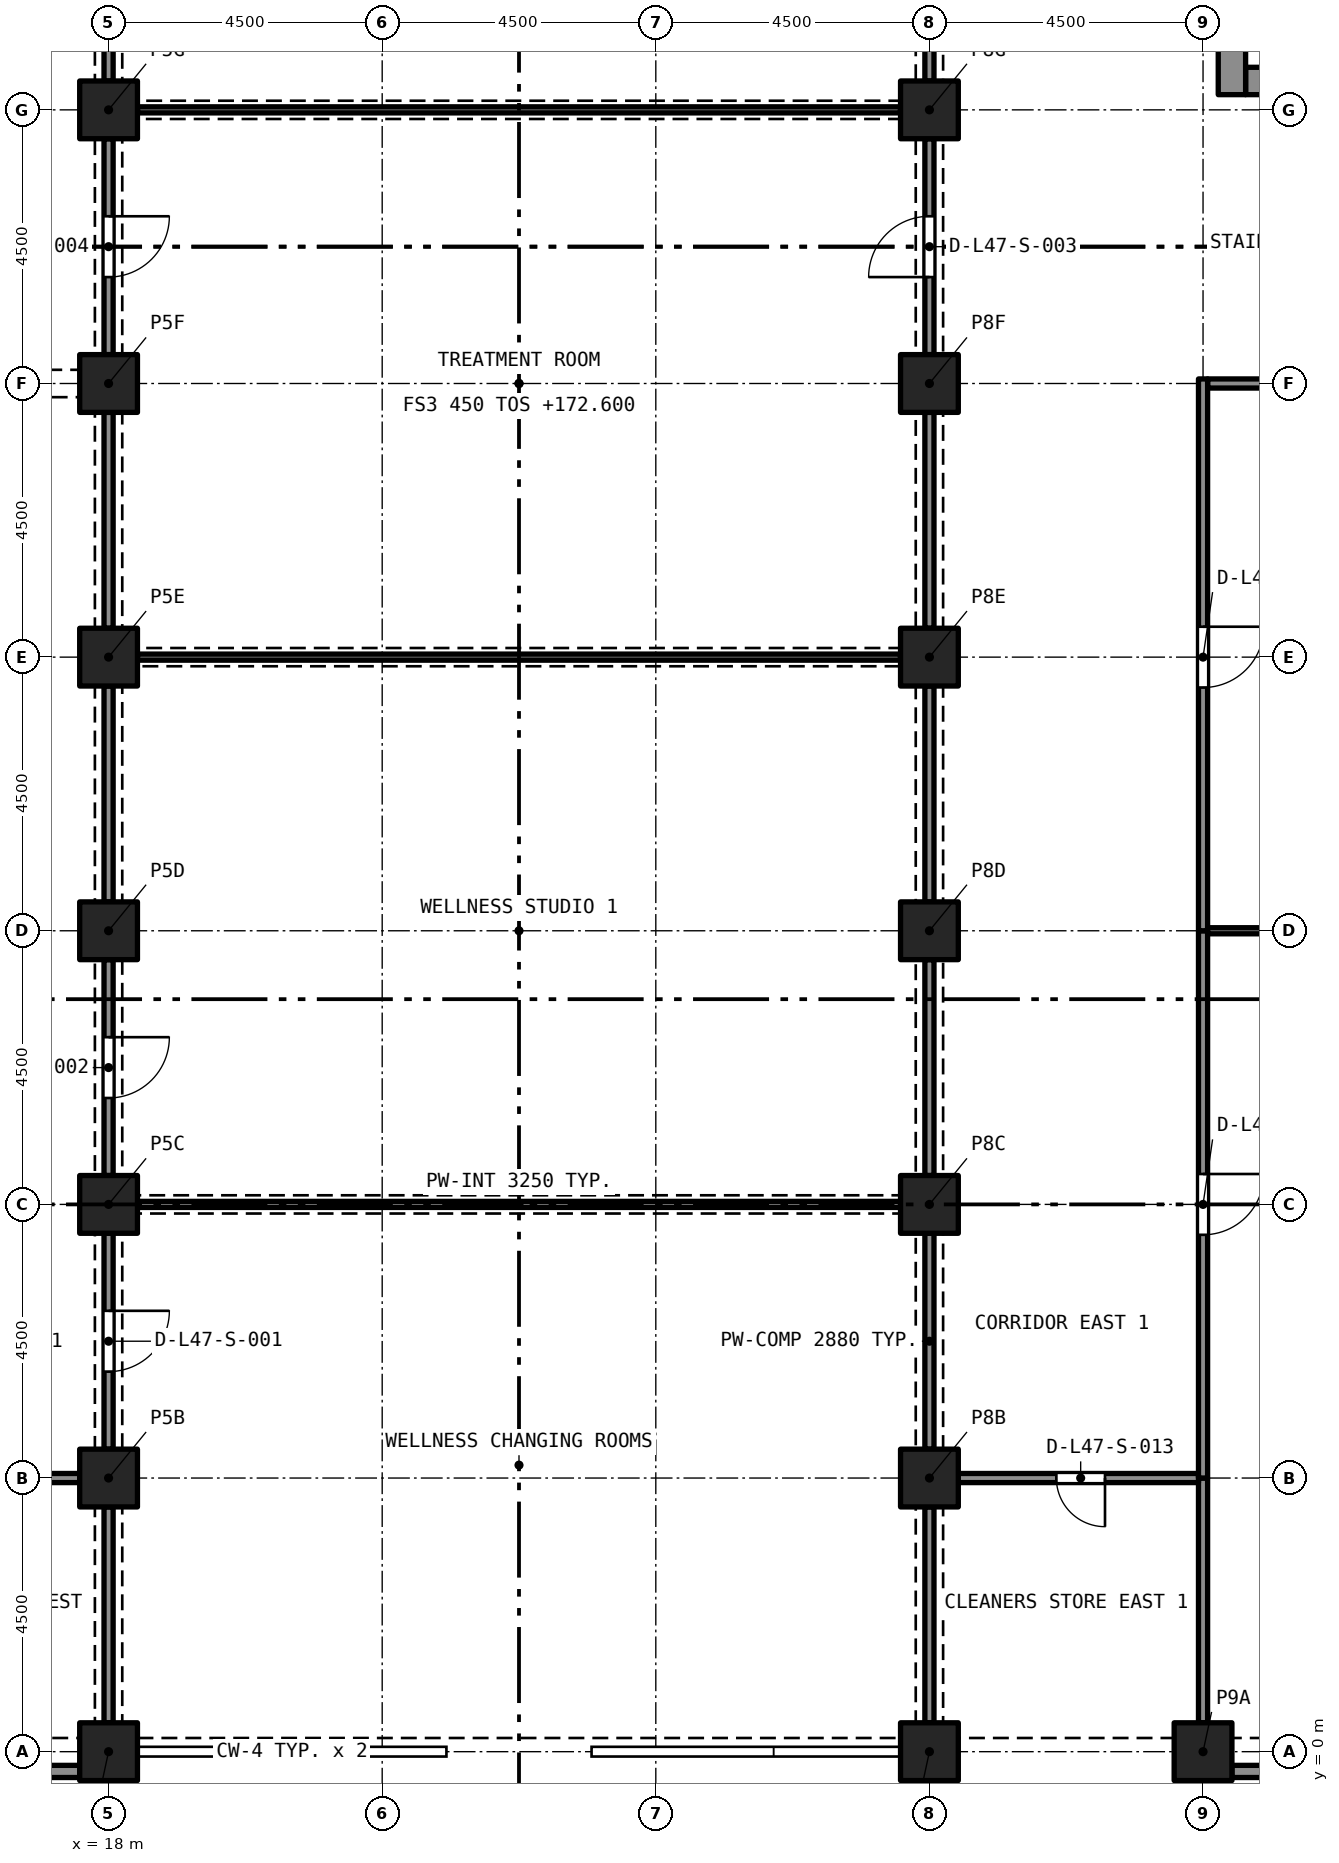
"""IFC4 building model, lengths in metres.
Left out: names, types, materials, properties, quantities, classifications, styles, units other than length and angle.
Written with IfcOpenShell. Run it as: python <this file> out.ifc"""

import sys

from ifc_helpers import new_model, si_unit, direction, frame, frame_2d, origin, origin_2d, place, context, subcontext, project, spatial, rectangle, extrude, element, fill, save


model = new_model("IFC4")
c1 = context("Model", 3, precision=1e-05, world=origin(), true_north=direction((0.0, 1.0)))
c2 = subcontext(c1, "Body", "Model", "MODEL_VIEW")
j1 = project(units=[si_unit("LENGTHUNIT", "METRE"), si_unit("PLANEANGLEUNIT", "RADIAN")], contexts=[c1])
p1 = place(None, origin())
s1 = spatial("IfcSite", under=j1, at=p1, CompositionType="ELEMENT")
p2 = place(p1, origin())
s2 = spatial("IfcBuilding", under=s1, at=p2, CompositionType="ELEMENT")
p3 = place(p2, frame((0.0, 0.0, 172.6)))
s3 = spatial("IfcBuildingStorey", under=s2, at=p3, CompositionType="ELEMENT", Elevation=172.6)
for number, where, z_axis, x_axis in (
    (1, (18.0, 0.0, 0.0), (0.0, 0.0, 1.0), (1.0, 0.0, 0.0)),
    (2, (31.5, 0.0, 0.0), (0.0, 0.0, 1.0), (1.0, 0.0, 0.0)),
    (3, (36.0, 0.0, 0.0), (0.0, 0.0, 1.0), (1.0, 0.0, 0.0)),
    (4, (18.0, 4.5, 0.0), (0.0, 0.0, 1.0), (1.0, 0.0, 0.0)),
    (5, (31.5, 4.5, 0.0), (0.0, 0.0, 1.0), (1.0, 0.0, 0.0)),
    (6, (18.0, 9.0, 0.0), (0.0, 0.0, 1.0), (1.0, 0.0, 0.0)),
    (7, (31.5, 9.0, 0.0), (0.0, 0.0, 1.0), (1.0, 0.0, 0.0)),
    (8, (18.0, 13.5, 0.0), (0.0, 0.0, 1.0), (1.0, 0.0, 0.0)),
    (9, (31.5, 13.5, 0.0), (0.0, 0.0, 1.0), (1.0, 0.0, 0.0)),
    (10, (18.0, 18.0, 0.0), (0.0, 0.0, 1.0), (1.0, 0.0, 0.0)),
    (11, (31.5, 18.0, 0.0), (0.0, 0.0, 1.0), (1.0, 0.0, 0.0)),
    (12, (18.0, 22.5, 0.0), (0.0, 0.0, 1.0), (1.0, 0.0, 0.0)),
    (13, (31.5, 22.5, 0.0), (0.0, 0.0, 1.0), (1.0, 0.0, 0.0)),
    (14, (18.0, 27.0, 0.0), (0.0, 0.0, 1.0), (1.0, 0.0, 0.0)),
    (15, (31.5, 27.0, 0.0), (0.0, 0.0, 1.0), (1.0, 0.0, 0.0)),
):
    element("IfcColumn", number, at=place(p3, frame(where, z_axis=z_axis, x_axis=x_axis)), inside=s3, PredefinedType="COLUMN", context=c2, shape_type="SweptSolid", body=[
        extrude(rectangle(XDim=0.95, YDim=0.95, at=origin_2d()), origin(), (0.0, 0.0, 1.0), 3.7),
    ])
p4 = place(p3, frame((36.7, 27.475, 0.0), z_axis=(0.0, 0.0, 1.0), x_axis=(1.0, 0.0, 0.0)))
e16 = element("IfcWall", 16, at=p4, inside=s3, PredefinedType="SOLIDWALL", context=c2, shape_type="SweptSolid", body=[
    extrude(rectangle(XDim=7.6, YDim=0.45, at=frame_2d((3.8, 0.0))), origin(), (0.0, 0.0, 1.0), 3.7),
])
p5 = place(p4, frame((5.775, 0.0, 0.0)))
e17 = element("IfcOpeningElement", 17, at=p5, cuts=e16, PredefinedType="OPENING", context=c2, shape_type="SweptSolid", body=[
    extrude(rectangle(XDim=1.1, YDim=2.1, at=frame_2d((0.55, 1.05))), frame((0.0, 0.235, 0.0), z_axis=(0.0, -1.0, 0.0), x_axis=(1.0, 0.0, 0.0)), (0.0, 0.0, 1.0), 0.47),
])
p6 = place(p4, frame((3.25, 0.0, 0.0)))
e18 = element("IfcOpeningElement", 18, at=p6, cuts=e16, PredefinedType="OPENING", context=c2, shape_type="SweptSolid", body=[
    extrude(rectangle(XDim=1.1, YDim=2.1, at=frame_2d((0.55, 1.05))), frame((0.0, 0.235, 0.0), z_axis=(0.0, -1.0, 0.0), x_axis=(1.0, 0.0, 0.0)), (0.0, 0.0, 1.0), 0.47),
])
p7 = place(p4, frame((0.725, 0.0, 0.0)))
e19 = element("IfcOpeningElement", 19, at=p7, cuts=e16, PredefinedType="OPENING", context=c2, shape_type="SweptSolid", body=[
    extrude(rectangle(XDim=1.1, YDim=2.1, at=frame_2d((0.55, 1.05))), frame((0.0, 0.235, 0.0), z_axis=(0.0, -1.0, 0.0), x_axis=(1.0, 0.0, 0.0)), (0.0, 0.0, 1.0), 0.47),
])
p8 = place(p3, frame((36.475, 27.25, 0.0), z_axis=(0.0, 0.0, 1.0), x_axis=(0.0, 1.0, 0.0)))
e20 = element("IfcWall", 20, at=p8, inside=s3, PredefinedType="SOLIDWALL", context=c2, shape_type="SweptSolid", body=[
    extrude(rectangle(XDim=13.0, YDim=0.45, at=frame_2d((6.5, 0.0))), origin(), (0.0, 0.0, 1.0), 3.7),
])
p9 = place(p8, frame((8.7, 0.0, 0.0)))
e21 = element("IfcOpeningElement", 21, at=p9, cuts=e20, PredefinedType="OPENING", context=c2, shape_type="SweptSolid", body=[
    extrude(rectangle(XDim=1.2, YDim=2.1, at=frame_2d((0.6, 1.05))), frame((0.0, 0.235, 0.0), z_axis=(0.0, -1.0, 0.0), x_axis=(1.0, 0.0, 0.0)), (0.0, 0.0, 1.0), 0.47),
])
p10 = place(p3, frame((17.525, -0.325, 0.0), z_axis=(0.0, 0.0, 1.0), x_axis=(-1.0, 0.0, 0.0)))
e22 = element("IfcWall", 22, at=p10, inside=s3, PredefinedType="SOLIDWALL", context=c2, shape_type="SweptSolid", body=[
    extrude(rectangle(XDim=3.55, YDim=0.2, at=frame_2d((1.775, 0.0))), origin(), (0.0, 0.0, 1.0), 3.7),
])
p11 = place(p10, frame((0.575, 0.0, 0.45)))
e23 = element("IfcOpeningElement", 23, at=p11, cuts=e22, PredefinedType="OPENING", context=c2, shape_type="SweptSolid", body=[
    extrude(rectangle(XDim=2.4, YDim=1.95, at=frame_2d((1.2, 0.975))), frame((0.0, 0.11, 0.0), z_axis=(0.0, -1.0, 0.0), x_axis=(1.0, 0.0, 0.0)), (0.0, 0.0, 1.0), 0.22),
])
p12 = place(p3, frame((40.025, -0.325, 0.0), z_axis=(0.0, 0.0, 1.0), x_axis=(-1.0, 0.0, 0.0)))
e24 = element("IfcWall", 24, at=p12, inside=s3, PredefinedType="SOLIDWALL", context=c2, shape_type="SweptSolid", body=[
    extrude(rectangle(XDim=3.55, YDim=0.2, at=frame_2d((1.775, 0.0))), origin(), (0.0, 0.0, 1.0), 3.7),
])
p13 = place(p12, frame((0.575, 0.0, 0.45)))
e25 = element("IfcOpeningElement", 25, at=p13, cuts=e24, PredefinedType="OPENING", context=c2, shape_type="SweptSolid", body=[
    extrude(rectangle(XDim=2.4, YDim=1.95, at=frame_2d((1.2, 0.975))), frame((0.0, 0.11, 0.0), z_axis=(0.0, -1.0, 0.0), x_axis=(1.0, 0.0, 0.0)), (0.0, 0.0, 1.0), 0.22),
])
p14 = place(p3, frame((18.475, 9.0, 0.0), z_axis=(0.0, 0.0, 1.0), x_axis=(1.0, 0.0, 0.0)))
e26 = element("IfcWall", 26, at=p14, inside=s3, PredefinedType="PARTITIONING", context=c2, shape_type="SweptSolid", body=[
    extrude(rectangle(XDim=12.55, YDim=0.1, at=frame_2d((6.275, 0.0))), origin(), (0.0, 0.0, 1.0), 3.25),
])
for number, where, z_axis, x_axis in (
    (27, (31.5, 0.475, 0.0), (0.0, 0.0, 1.0), (0.0, 1.0, 0.0)),
    (28, (31.5, 4.975, 0.0), (0.0, 0.0, 1.0), (0.0, 1.0, 0.0)),
    (29, (18.0, 0.475, 0.0), (0.0, 0.0, 1.0), (0.0, 1.0, 0.0)),
):
    element("IfcWall", number, at=place(p3, frame(where, z_axis=z_axis, x_axis=x_axis)), inside=s3, PredefinedType="PARTITIONING", context=c2, shape_type="SweptSolid", body=[
        extrude(rectangle(XDim=3.55, YDim=0.15, at=frame_2d((1.775, 0.0))), origin(), (0.0, 0.0, 1.0), 2.88),
    ])
p15 = place(p3, frame((18.0, 8.525, 0.0), z_axis=(0.0, 0.0, 1.0), x_axis=(0.0, -1.0, 0.0)))
e30 = element("IfcWall", 30, at=p15, inside=s3, PredefinedType="PARTITIONING", context=c2, shape_type="SweptSolid", body=[
    extrude(rectangle(XDim=3.55, YDim=0.15, at=frame_2d((1.775, 0.0))), origin(), (0.0, 0.0, 1.0), 2.88),
])
p16 = place(p15, frame((1.275, 0.0, 0.0)))
e31 = element("IfcOpeningElement", 31, at=p16, cuts=e30, PredefinedType="OPENING", context=c2, shape_type="SweptSolid", body=[
    extrude(rectangle(XDim=1.0, YDim=2.1, at=frame_2d((0.5, 1.05))), frame((0.0, 0.085, 0.0), z_axis=(0.0, -1.0, 0.0), x_axis=(1.0, 0.0, 0.0)), (0.0, 0.0, 1.0), 0.17),
])
p17 = place(p3, frame((18.475, 18.0, 0.0), z_axis=(0.0, 0.0, 1.0), x_axis=(1.0, 0.0, 0.0)))
e32 = element("IfcWall", 32, at=p17, inside=s3, PredefinedType="PARTITIONING", context=c2, shape_type="SweptSolid", body=[
    extrude(rectangle(XDim=12.55, YDim=0.1, at=frame_2d((6.275, 0.0))), origin(), (0.0, 0.0, 1.0), 3.25),
])
for number, where, z_axis, x_axis in (
    (33, (31.5, 13.975, 0.0), (0.0, 0.0, 1.0), (0.0, 1.0, 0.0)),
    (34, (31.5, 9.475, 0.0), (0.0, 0.0, 1.0), (0.0, 1.0, 0.0)),
):
    element("IfcWall", number, at=place(p3, frame(where, z_axis=z_axis, x_axis=x_axis)), inside=s3, PredefinedType="PARTITIONING", context=c2, shape_type="SweptSolid", body=[
        extrude(rectangle(XDim=3.55, YDim=0.15, at=frame_2d((1.775, 0.0))), origin(), (0.0, 0.0, 1.0), 2.88),
    ])
p18 = place(p3, frame((18.0, 13.025, 0.0), z_axis=(0.0, 0.0, 1.0), x_axis=(0.0, -1.0, 0.0)))
e35 = element("IfcWall", 35, at=p18, inside=s3, PredefinedType="PARTITIONING", context=c2, shape_type="SweptSolid", body=[
    extrude(rectangle(XDim=3.55, YDim=0.15, at=frame_2d((1.775, 0.0))), origin(), (0.0, 0.0, 1.0), 2.88),
])
p19 = place(p18, frame((1.275, 0.0, 0.0)))
e36 = element("IfcOpeningElement", 36, at=p19, cuts=e35, PredefinedType="OPENING", context=c2, shape_type="SweptSolid", body=[
    extrude(rectangle(XDim=1.0, YDim=2.1, at=frame_2d((0.5, 1.05))), frame((0.0, 0.085, 0.0), z_axis=(0.0, -1.0, 0.0), x_axis=(1.0, 0.0, 0.0)), (0.0, 0.0, 1.0), 0.17),
])
p20 = place(p3, frame((18.0, 13.975, 0.0), z_axis=(0.0, 0.0, 1.0), x_axis=(0.0, 1.0, 0.0)))
e37 = element("IfcWall", 37, at=p20, inside=s3, PredefinedType="PARTITIONING", context=c2, shape_type="SweptSolid", body=[
    extrude(rectangle(XDim=3.55, YDim=0.15, at=frame_2d((1.775, 0.0))), origin(), (0.0, 0.0, 1.0), 2.88),
])
p21 = place(p3, frame((18.475, 27.0, 0.0), z_axis=(0.0, 0.0, 1.0), x_axis=(1.0, 0.0, 0.0)))
e38 = element("IfcWall", 38, at=p21, inside=s3, PredefinedType="PARTITIONING", context=c2, shape_type="SweptSolid", body=[
    extrude(rectangle(XDim=12.55, YDim=0.1, at=frame_2d((6.275, 0.0))), origin(), (0.0, 0.0, 1.0), 3.25),
])
p22 = place(p3, frame((31.5, 22.975, 0.0), z_axis=(0.0, 0.0, 1.0), x_axis=(0.0, 1.0, 0.0)))
e39 = element("IfcWall", 39, at=p22, inside=s3, PredefinedType="PARTITIONING", context=c2, shape_type="SweptSolid", body=[
    extrude(rectangle(XDim=3.55, YDim=0.15, at=frame_2d((1.775, 0.0))), origin(), (0.0, 0.0, 1.0), 2.88),
])
p23 = place(p22, frame((1.275, 0.0, 0.0)))
e40 = element("IfcOpeningElement", 40, at=p23, cuts=e39, PredefinedType="OPENING", context=c2, shape_type="SweptSolid", body=[
    extrude(rectangle(XDim=1.0, YDim=2.1, at=frame_2d((0.5, 1.05))), frame((0.0, 0.085, 0.0), z_axis=(0.0, -1.0, 0.0), x_axis=(1.0, 0.0, 0.0)), (0.0, 0.0, 1.0), 0.17),
])
p24 = place(p3, frame((31.5, 18.475, 0.0), z_axis=(0.0, 0.0, 1.0), x_axis=(0.0, 1.0, 0.0)))
e41 = element("IfcWall", 41, at=p24, inside=s3, PredefinedType="PARTITIONING", context=c2, shape_type="SweptSolid", body=[
    extrude(rectangle(XDim=3.55, YDim=0.15, at=frame_2d((1.775, 0.0))), origin(), (0.0, 0.0, 1.0), 2.88),
])
p25 = place(p3, frame((18.0, 26.525, 0.0), z_axis=(0.0, 0.0, 1.0), x_axis=(0.0, -1.0, 0.0)))
e42 = element("IfcWall", 42, at=p25, inside=s3, PredefinedType="PARTITIONING", context=c2, shape_type="SweptSolid", body=[
    extrude(rectangle(XDim=3.55, YDim=0.15, at=frame_2d((1.775, 0.0))), origin(), (0.0, 0.0, 1.0), 2.88),
])
p26 = place(p25, frame((1.275, 0.0, 0.0)))
e43 = element("IfcOpeningElement", 43, at=p26, cuts=e42, PredefinedType="OPENING", context=c2, shape_type="SweptSolid", body=[
    extrude(rectangle(XDim=1.0, YDim=2.1, at=frame_2d((0.5, 1.05))), frame((0.0, 0.085, 0.0), z_axis=(0.0, -1.0, 0.0), x_axis=(1.0, 0.0, 0.0)), (0.0, 0.0, 1.0), 0.17),
])
for number, where, z_axis, x_axis in (
    (44, (18.0, 18.475, 0.0), (0.0, 0.0, 1.0), (0.0, 1.0, 0.0)),
    (45, (31.5, 27.475, 0.0), (0.0, 0.0, 1.0), (0.0, 1.0, 0.0)),
):
    element("IfcWall", number, at=place(p3, frame(where, z_axis=z_axis, x_axis=x_axis)), inside=s3, PredefinedType="PARTITIONING", context=c2, shape_type="SweptSolid", body=[
        extrude(rectangle(XDim=3.55, YDim=0.15, at=frame_2d((1.775, 0.0))), origin(), (0.0, 0.0, 1.0), 2.88),
    ])
p27 = place(p3, frame((18.0, 31.025, 0.0), z_axis=(0.0, 0.0, 1.0), x_axis=(0.0, -1.0, 0.0)))
e46 = element("IfcWall", 46, at=p27, inside=s3, PredefinedType="PARTITIONING", context=c2, shape_type="SweptSolid", body=[
    extrude(rectangle(XDim=3.55, YDim=0.15, at=frame_2d((1.775, 0.0))), origin(), (0.0, 0.0, 1.0), 2.88),
])
p28 = place(p27, frame((1.175, 0.0, 0.0)))
e47 = element("IfcOpeningElement", 47, at=p28, cuts=e46, PredefinedType="OPENING", context=c2, shape_type="SweptSolid", body=[
    extrude(rectangle(XDim=1.2, YDim=2.1, at=frame_2d((0.6, 1.05))), frame((0.0, 0.085, 0.0), z_axis=(0.0, -1.0, 0.0), x_axis=(1.0, 0.0, 0.0)), (0.0, 0.0, 1.0), 0.17),
])
p29 = place(p3, frame((36.075, 22.5, 0.0), z_axis=(0.0, 0.0, 1.0), x_axis=(1.0, 0.0, 0.0)))
e48 = element("IfcWall", 48, at=p29, inside=s3, PredefinedType="PARTITIONING", context=c2, shape_type="SweptSolid", body=[
    extrude(rectangle(XDim=12.95, YDim=0.15, at=frame_2d((6.475, 0.0))), origin(), (0.0, 0.0, 1.0), 3.4),
])
p30 = place(p3, frame((36.0, 0.475, 0.0), z_axis=(0.0, 0.0, 1.0), x_axis=(0.0, 1.0, 0.0)))
e49 = element("IfcWall", 49, at=p30, inside=s3, PredefinedType="PARTITIONING", context=c2, shape_type="SweptSolid", body=[
    extrude(rectangle(XDim=4.025, YDim=0.15, at=frame_2d((2.012, 0.0))), origin(), (0.0, 0.0, 1.0), 3.4),
])
p31 = place(p3, frame((35.925, 4.5, 0.0), z_axis=(0.0, 0.0, 1.0), x_axis=(-1.0, 0.0, 0.0)))
e50 = element("IfcWall", 50, at=p31, inside=s3, PredefinedType="PARTITIONING", context=c2, shape_type="SweptSolid", body=[
    extrude(rectangle(XDim=3.95, YDim=0.15, at=frame_2d((1.975, 0.0))), origin(), (0.0, 0.0, 1.0), 3.4),
])
p32 = place(p31, frame((1.538, 0.0, 0.0)))
e51 = element("IfcOpeningElement", 51, at=p32, cuts=e50, PredefinedType="OPENING", context=c2, shape_type="SweptSolid", body=[
    extrude(rectangle(XDim=0.8, YDim=2.1, at=frame_2d((0.4, 1.05))), frame((0.0, 0.085, 0.0), z_axis=(0.0, -1.0, 0.0), x_axis=(1.0, 0.0, 0.0)), (0.0, 0.0, 1.0), 0.17),
])
p33 = place(p3, frame((36.0, 13.5, 0.0), z_axis=(0.0, 0.0, 1.0), x_axis=(0.0, -1.0, 0.0)))
e52 = element("IfcWall", 52, at=p33, inside=s3, PredefinedType="PARTITIONING", context=c2, shape_type="SweptSolid", body=[
    extrude(rectangle(XDim=9.0, YDim=0.15, at=frame_2d((4.5, 0.0))), origin(), (0.0, 0.0, 1.0), 3.4),
])
p34 = place(p33, frame((4.0, 0.0, 0.0)))
e53 = element("IfcOpeningElement", 53, at=p34, cuts=e52, PredefinedType="OPENING", context=c2, shape_type="SweptSolid", body=[
    extrude(rectangle(XDim=1.0, YDim=2.1, at=frame_2d((0.5, 1.05))), frame((0.0, 0.085, 0.0), z_axis=(0.0, -1.0, 0.0), x_axis=(1.0, 0.0, 0.0)), (0.0, 0.0, 1.0), 0.17),
])
p35 = place(p3, frame((36.0, 22.575, 0.0), z_axis=(0.0, 0.0, 1.0), x_axis=(0.0, -1.0, 0.0)))
e54 = element("IfcWall", 54, at=p35, inside=s3, PredefinedType="PARTITIONING", context=c2, shape_type="SweptSolid", body=[
    extrude(rectangle(XDim=9.075, YDim=0.15, at=frame_2d((4.538, 0.0))), origin(), (0.0, 0.0, 1.0), 3.4),
])
p36 = place(p35, frame((4.075, 0.0, 0.0)))
e55 = element("IfcOpeningElement", 55, at=p36, cuts=e54, PredefinedType="OPENING", context=c2, shape_type="SweptSolid", body=[
    extrude(rectangle(XDim=1.0, YDim=2.1, at=frame_2d((0.5, 1.05))), frame((0.0, 0.085, 0.0), z_axis=(0.0, -1.0, 0.0), x_axis=(1.0, 0.0, 0.0)), (0.0, 0.0, 1.0), 0.17),
])
p37 = place(p3, frame((36.075, 13.5, 0.0), z_axis=(0.0, 0.0, 1.0), x_axis=(1.0, 0.0, 0.0)))
e56 = element("IfcWall", 56, at=p37, inside=s3, PredefinedType="PARTITIONING", context=c2, shape_type="SweptSolid", body=[
    extrude(rectangle(XDim=12.95, YDim=0.1, at=frame_2d((6.475, 0.0))), origin(), (0.0, 0.0, 1.0), 3.4),
])
p38 = place(p3, frame((17.525, 4.5, 0.0), z_axis=(0.0, 0.0, 1.0), x_axis=(-1.0, 0.0, 0.0)))
e57 = element("IfcWall", 57, at=p38, inside=s3, PredefinedType="PARTITIONING", context=c2, shape_type="SweptSolid", body=[
    extrude(rectangle(XDim=3.95, YDim=0.15, at=frame_2d((1.975, 0.0))), origin(), (0.0, 0.0, 1.0), 3.4),
])
p39 = place(p38, frame((1.613, 0.0, 0.0)))
e58 = element("IfcOpeningElement", 58, at=p39, cuts=e57, PredefinedType="OPENING", context=c2, shape_type="SweptSolid", body=[
    extrude(rectangle(XDim=0.8, YDim=2.1, at=frame_2d((0.4, 1.05))), frame((0.0, 0.085, 0.0), z_axis=(0.0, -1.0, 0.0), x_axis=(1.0, 0.0, 0.0)), (0.0, 0.0, 1.0), 0.17),
])
p40 = place(p16, origin())
e59 = element("IfcDoor", 59, at=p40, inside=s3, OperationType="SINGLE_SWING_RIGHT", PredefinedType="DOOR", context=c2, shape_type="SweptSolid", body=[
    extrude(rectangle(XDim=1.0, YDim=2.1, at=frame_2d((0.5, 1.05))), frame((0.0, 0.025, 0.0), z_axis=(0.0, -1.0, 0.0), x_axis=(1.0, 0.0, 0.0)), (0.0, 0.0, 1.0), 0.05),
])
fill(e31, e59)
p41 = place(p19, origin())
e60 = element("IfcDoor", 60, at=p41, inside=s3, OperationType="SINGLE_SWING_RIGHT", PredefinedType="DOOR", context=c2, shape_type="SweptSolid", body=[
    extrude(rectangle(XDim=1.0, YDim=2.1, at=frame_2d((0.5, 1.05))), frame((0.0, 0.025, 0.0), z_axis=(0.0, -1.0, 0.0), x_axis=(1.0, 0.0, 0.0)), (0.0, 0.0, 1.0), 0.05),
])
fill(e36, e60)
p42 = place(p23, origin())
e61 = element("IfcDoor", 61, at=p42, inside=s3, OperationType="SINGLE_SWING_RIGHT", PredefinedType="DOOR", context=c2, shape_type="SweptSolid", body=[
    extrude(rectangle(XDim=1.0, YDim=2.1, at=frame_2d((0.5, 1.05))), frame((0.0, 0.025, 0.0), z_axis=(0.0, -1.0, 0.0), x_axis=(1.0, 0.0, 0.0)), (0.0, 0.0, 1.0), 0.05),
])
fill(e40, e61)
p43 = place(p26, origin())
e62 = element("IfcDoor", 62, at=p43, inside=s3, OperationType="SINGLE_SWING_RIGHT", PredefinedType="DOOR", context=c2, shape_type="SweptSolid", body=[
    extrude(rectangle(XDim=1.0, YDim=2.1, at=frame_2d((0.5, 1.05))), frame((0.0, 0.025, 0.0), z_axis=(0.0, -1.0, 0.0), x_axis=(1.0, 0.0, 0.0)), (0.0, 0.0, 1.0), 0.05),
])
fill(e43, e62)
p44 = place(p32, origin())
e63 = element("IfcDoor", 63, at=p44, inside=s3, OperationType="SINGLE_SWING_LEFT", PredefinedType="DOOR", context=c2, shape_type="SweptSolid", body=[
    extrude(rectangle(XDim=0.8, YDim=2.1, at=frame_2d((0.4, 1.05))), frame((0.0, 0.025, 0.0), z_axis=(0.0, -1.0, 0.0), x_axis=(1.0, 0.0, 0.0)), (0.0, 0.0, 1.0), 0.05),
])
fill(e51, e63)
p45 = place(p34, origin())
e64 = element("IfcDoor", 64, at=p45, inside=s3, OperationType="SINGLE_SWING_RIGHT", PredefinedType="DOOR", context=c2, shape_type="SweptSolid", body=[
    extrude(rectangle(XDim=1.0, YDim=2.1, at=frame_2d((0.5, 1.05))), frame((0.0, 0.025, 0.0), z_axis=(0.0, -1.0, 0.0), x_axis=(1.0, 0.0, 0.0)), (0.0, 0.0, 1.0), 0.05),
])
fill(e53, e64)
p46 = place(p36, origin())
e65 = element("IfcDoor", 65, at=p46, inside=s3, OperationType="SINGLE_SWING_RIGHT", PredefinedType="DOOR", context=c2, shape_type="SweptSolid", body=[
    extrude(rectangle(XDim=1.0, YDim=2.1, at=frame_2d((0.5, 1.05))), frame((0.0, 0.025, 0.0), z_axis=(0.0, -1.0, 0.0), x_axis=(1.0, 0.0, 0.0)), (0.0, 0.0, 1.0), 0.05),
])
fill(e55, e65)
save(model, sys.argv[1])
